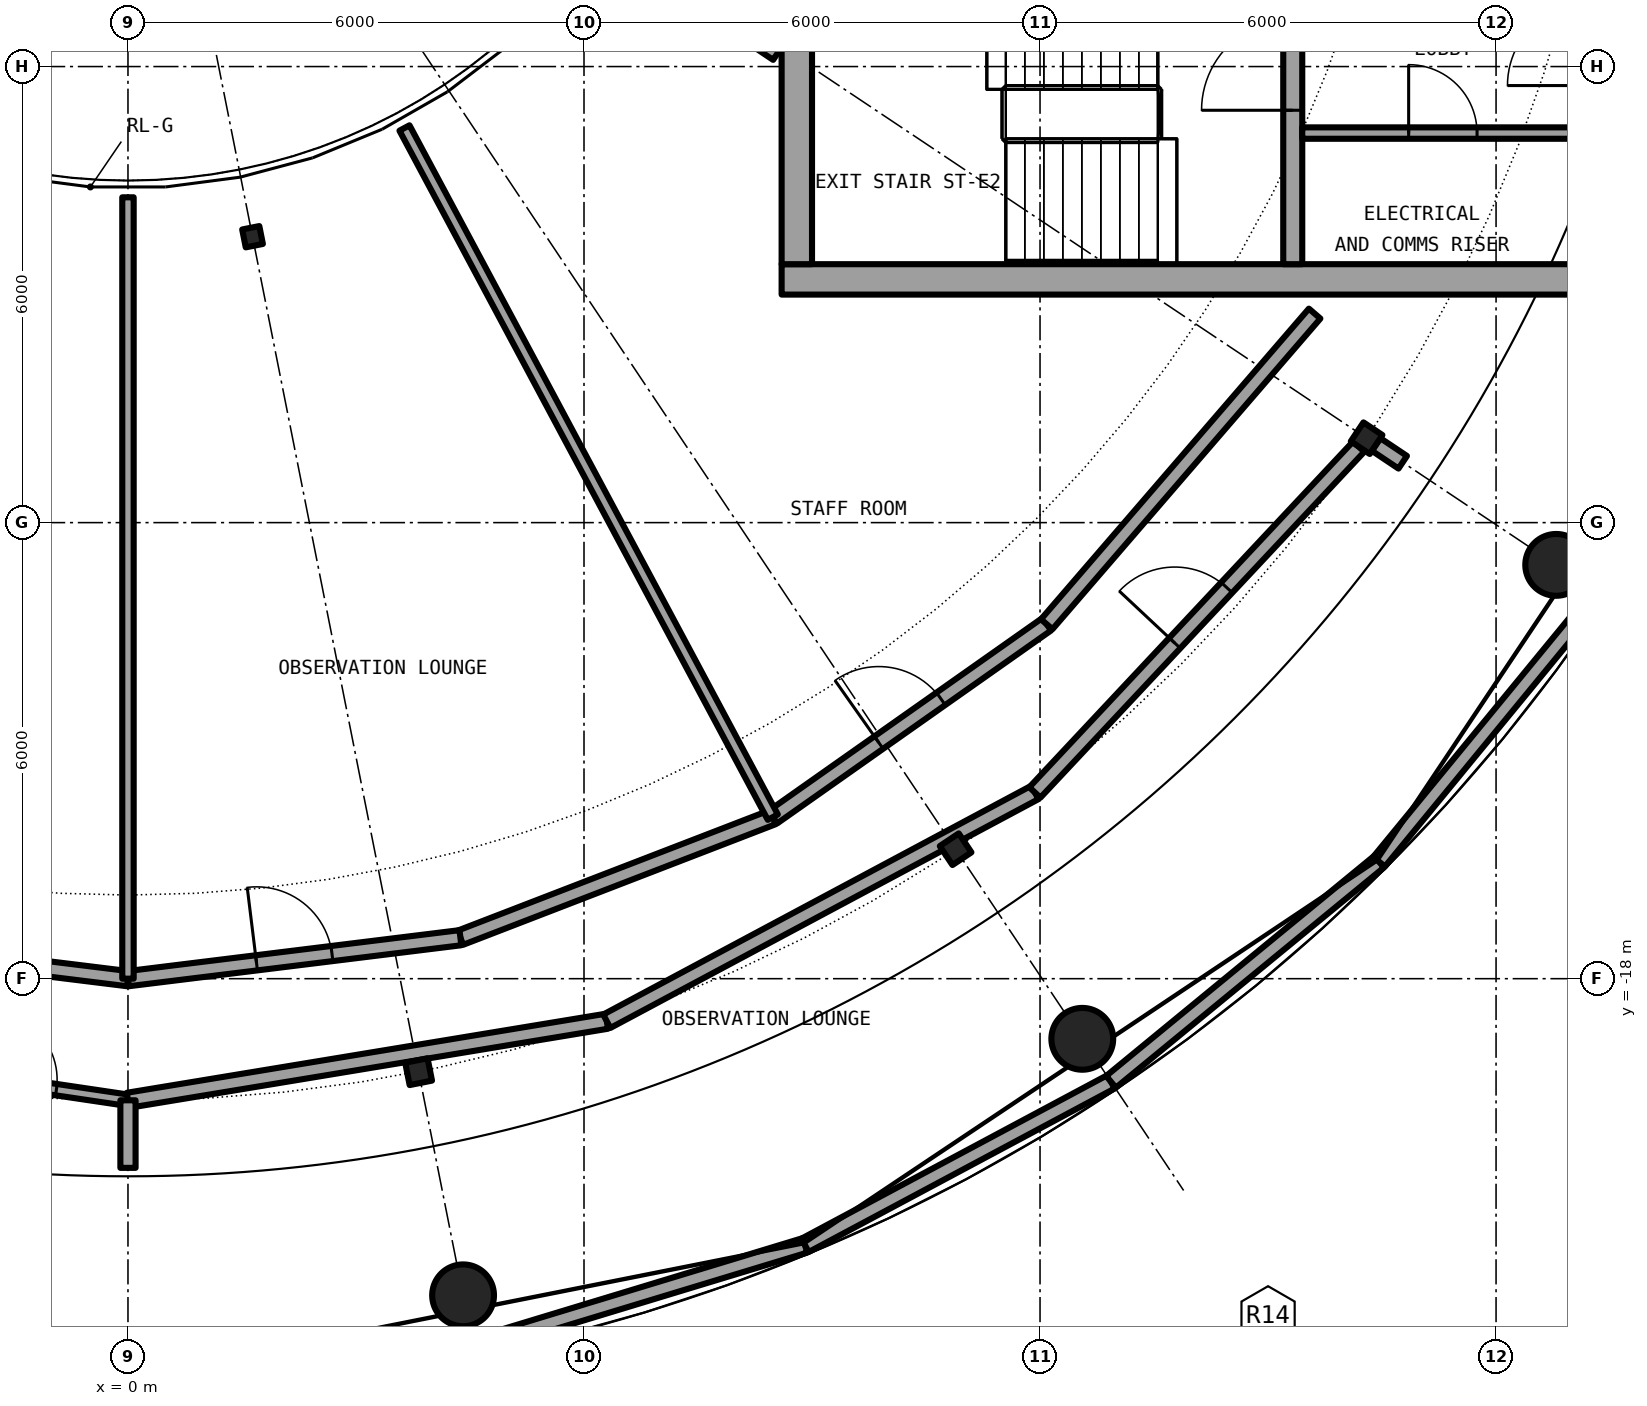
"""IFC4 building model, lengths in metres.
Left out: names, types, materials, properties, quantities, classifications, styles, units other than length and angle.
Written with IfcOpenShell. Run it as: python <this file> out.ifc"""

import sys

from ifc_helpers import new_model, si_unit, direction, frame, frame_2d, origin, origin_2d, place, context, subcontext, project, spatial, rectangle, hollow_circle, i_section, extrude, element, fill, save


model = new_model("IFC4")
c1 = context("Model", 3, precision=1e-05, world=origin(), true_north=direction((0.0, 1.0)))
c2 = subcontext(c1, "Body", "Model", "MODEL_VIEW")
j1 = project(units=[si_unit("LENGTHUNIT", "METRE"), si_unit("PLANEANGLEUNIT", "RADIAN")], contexts=[c1])
p1 = place(None, origin())
s1 = spatial("IfcSite", under=j1, at=p1, CompositionType="ELEMENT")
p2 = place(p1, origin())
s2 = spatial("IfcBuilding", under=s1, at=p2, CompositionType="ELEMENT")
p3 = place(p2, frame((0.0, 0.0, 255.4)))
s3 = spatial("IfcBuildingStorey", under=s2, at=p3, CompositionType="ELEMENT", Elevation=255.4)
for number, where, z_axis, x_axis in (
    (1, (4.409, -22.166, 0.0), (0.0, 0.0, 1.0), (1.0, 0.0, 0.0)),
    (2, (12.556, -18.791, 0.0), (0.0, 0.0, 1.0), (1.0, 0.0, 0.0)),
    (3, (18.791, -12.556, 0.0), (0.0, 0.0, 1.0), (1.0, 0.0, 0.0)),
):
    element("IfcColumn", number, at=place(p3, frame(where, z_axis=z_axis, x_axis=x_axis)), inside=s3, PredefinedType="COLUMN", context=c2, shape_type="SweptSolid", body=[
        extrude(hollow_circle(Radius=0.406, WallThickness=0.03, at=origin_2d()), origin(), (0.0, 0.0, 1.0), 6.1),
    ])
for number, where, z_axis, x_axis in (
    (4, (3.824, -19.223, 0.0), (0.0, 0.0, 1.0), (0.195, -0.981, 0.0)),
    (5, (10.889, -16.297, 0.0), (0.0, 0.0, 1.0), (0.556, -0.831, 0.0)),
    (6, (16.297, -10.889, 0.0), (0.0, 0.0, 1.0), (0.831, -0.556, 0.0)),
):
    element("IfcColumn", number, at=place(p3, frame(where, z_axis=z_axis, x_axis=x_axis)), inside=s3, PredefinedType="COLUMN", context=c2, shape_type="SweptSolid", body=[
        extrude(i_section(OverallWidth=0.3, OverallDepth=0.3, WebThickness=0.011, FlangeThickness=0.019, FilletRadius=0.027, at=origin_2d()), origin(), (0.0, 0.0, 1.0), 6.1),
    ])
p4 = place(p3, frame((1.639, -8.239, 0.0), z_axis=(0.0, 0.0, 1.0), x_axis=(0.195090322016, -0.980785280403, 0.0)))
e7 = element("IfcColumn", 7, at=p4, inside=s3, PredefinedType="COLUMN", context=c2, shape_type="SweptSolid", body=[
    extrude(i_section(OverallWidth=0.24, OverallDepth=0.23, WebThickness=0.008, FlangeThickness=0.012, FilletRadius=0.021, at=origin_2d()), origin(), (0.0, 0.0, 1.0), 6.1),
])
p5 = place(p3, frame((4.542, -22.833, 6.1), z_axis=(0.0, 0.0, 1.0), x_axis=(0.956924910545, 0.29033552242, 0.0)))
e8 = element("IfcWall", 8, at=p5, inside=s3, PredefinedType="PARAPET", context=c2, shape_type="SweptSolid", body=[
    extrude(rectangle(XDim=4.563, YDim=0.2, at=frame_2d((2.282, 0.0))), origin(), (0.0, 0.0, 1.0), 1.1),
])
p6 = place(p3, frame((8.909, -21.508, 6.1), z_axis=(0.0, 0.0, 1.0), x_axis=(0.881954289711, 0.471334945511, 0.0)))
e9 = element("IfcWall", 9, at=p6, inside=s3, PredefinedType="PARAPET", context=c2, shape_type="SweptSolid", body=[
    extrude(rectangle(XDim=4.564, YDim=0.2, at=frame_2d((2.282, 0.0))), origin(), (0.0, 0.0, 1.0), 1.1),
])
for number, where, z_axis, x_axis in (
    (10, (12.934, -19.357, 6.1), (0.0, 0.0, 1.0), (0.773, 0.635, 0.0)),
    (11, (16.461, -16.461, 6.1), (0.0, 0.0, 1.0), (0.635, 0.773, 0.0)),
):
    element("IfcWall", number, at=place(p3, frame(where, z_axis=z_axis, x_axis=x_axis)), inside=s3, PredefinedType="PARAPET", context=c2, shape_type="SweptSolid", body=[
        extrude(rectangle(XDim=4.563, YDim=0.2, at=frame_2d((2.282, 0.0))), origin(), (0.0, 0.0, 1.0), 1.1),
    ])
p7 = place(p3, frame((8.6, -8.8, 0.0), z_axis=(0.0, 0.0, 1.0), x_axis=(1.0, 0.0, 0.0)))
e12 = element("IfcWall", 12, at=p7, inside=s3, PredefinedType="SHEAR", context=c2, shape_type="SweptSolid", body=[
    extrude(rectangle(XDim=12.5, YDim=0.4, at=frame_2d((6.25, 0.0))), origin(), (0.0, 0.0, 1.0), 6.1),
])
p8 = place(p7, frame((10.825, 0.0, 0.0)))
e13 = element("IfcOpeningElement", 13, at=p8, cuts=e12, PredefinedType="OPENING", context=c2, shape_type="SweptSolid", body=[
    extrude(rectangle(XDim=1.2, YDim=2.3, at=frame_2d((0.6, 1.15))), frame((0.0, 0.21, 0.0), z_axis=(0.0, -1.0, 0.0), x_axis=(1.0, 0.0, 0.0)), (0.0, 0.0, 1.0), 0.42),
])
p9 = place(p3, frame((8.8, -8.6, 0.0), z_axis=(0.0, 0.0, 1.0), x_axis=(0.0, 1.0, 0.0)))
e14 = element("IfcWall", 14, at=p9, inside=s3, PredefinedType="SHEAR", context=c2, shape_type="SweptSolid", body=[
    extrude(rectangle(XDim=17.2, YDim=0.4, at=frame_2d((8.6, 0.0))), origin(), (0.0, 0.0, 1.0), 6.1),
])
p10 = place(p9, frame((7.4, 0.0, 0.1)))
e15 = element("IfcOpeningElement", 15, at=p10, cuts=e14, PredefinedType="OPENING", context=c2, shape_type="SweptSolid", body=[
    extrude(rectangle(XDim=2.4, YDim=2.2, at=frame_2d((1.2, 1.1))), frame((0.0, 0.21, 0.0), z_axis=(0.0, -1.0, 0.0), x_axis=(1.0, 0.0, 0.0)), (0.0, 0.0, 1.0), 0.42),
])
p11 = place(p3, frame((15.325, -8.6, 0.0), z_axis=(0.0, 0.0, 1.0), x_axis=(0.0, 1.0, 0.0)))
e16 = element("IfcWall", 16, at=p11, inside=s3, PredefinedType="SHEAR", context=c2, shape_type="SweptSolid", body=[
    extrude(rectangle(XDim=3.95, YDim=0.25, at=frame_2d((1.975, 0.0))), origin(), (0.0, 0.0, 1.0), 6.1),
])
p12 = place(p11, frame((2.025, 0.0, 0.0)))
e17 = element("IfcOpeningElement", 17, at=p12, cuts=e16, PredefinedType="OPENING", context=c2, shape_type="SweptSolid", body=[
    extrude(rectangle(XDim=1.2, YDim=2.3, at=frame_2d((0.6, 1.15))), frame((0.0, 0.135, 0.0), z_axis=(0.0, -1.0, 0.0), x_axis=(1.0, 0.0, 0.0)), (0.0, 0.0, 1.0), 0.27),
])
p13 = place(p3, frame((15.45, -6.875, 0.0), z_axis=(0.0, 0.0, 1.0), x_axis=(1.0, 0.0, 0.0)))
e18 = element("IfcWall", 18, at=p13, inside=s3, PredefinedType="PARTITIONING", context=c2, shape_type="SweptSolid", body=[
    extrude(rectangle(XDim=3.7, YDim=0.15, at=frame_2d((1.85, 0.0))), origin(), (0.0, 0.0, 1.0), 5.75),
])
p14 = place(p13, frame((1.4, 0.0, 0.0)))
e19 = element("IfcOpeningElement", 19, at=p14, cuts=e18, PredefinedType="OPENING", context=c2, shape_type="SweptSolid", body=[
    extrude(rectangle(XDim=0.9, YDim=2.3, at=frame_2d((0.45, 1.15))), frame((0.0, 0.085, 0.0), z_axis=(0.0, -1.0, 0.0), x_axis=(1.0, 0.0, 0.0)), (0.0, 0.0, 1.0), 0.17),
])
p15 = place(p3, frame((-5.69, -18.756, 0.0), z_axis=(0.0, 0.0, 1.0), x_axis=(0.989177240103, -0.146725552177, 0.0)))
e20 = element("IfcWall", 20, at=p15, inside=s3, PredefinedType="PARTITIONING", context=c2, shape_type="SweptSolid", body=[
    extrude(rectangle(XDim=5.752, YDim=0.15, at=frame_2d((2.876, 0.0))), origin(), (0.0, 0.0, 1.0), 5.5),
])
p16 = place(p15, frame((2.55, 0.0, 0.0)))
e21 = element("IfcOpeningElement", 21, at=p16, cuts=e20, PredefinedType="OPENING", context=c2, shape_type="SweptSolid", body=[
    extrude(rectangle(XDim=1.0, YDim=2.3, at=frame_2d((0.5, 1.15))), frame((0.0, 0.085, 0.0), z_axis=(0.0, -1.0, 0.0), x_axis=(1.0, 0.0, 0.0)), (0.0, 0.0, 1.0), 0.17),
])
p17 = place(p15, frame((3.9, 0.0, 0.0)))
e22 = element("IfcOpeningElement", 22, at=p17, cuts=e20, PredefinedType="OPENING", context=c2, shape_type="SweptSolid", body=[
    extrude(rectangle(XDim=0.9, YDim=2.3, at=frame_2d((0.45, 1.15))), frame((0.0, 0.085, 0.0), z_axis=(0.0, -1.0, 0.0), x_axis=(1.0, 0.0, 0.0)), (0.0, 0.0, 1.0), 0.17),
])
p18 = place(p3, frame((0.0, -19.6, 0.0), z_axis=(0.0, 0.0, 1.0), x_axis=(0.986645929742, 0.162879738837, 0.0)))
e23 = element("IfcWall", 23, at=p18, inside=s3, PredefinedType="PARTITIONING", context=c2, shape_type="SweptSolid", body=[
    extrude(rectangle(XDim=6.385, YDim=0.2, at=frame_2d((3.193, 0.0))), origin(), (0.0, 0.0, 1.0), 5.5),
])
p19 = place(p3, frame((6.3, -18.56, 0.0), z_axis=(0.0, 0.0, 1.0), x_axis=(0.88193879345, 0.471363940716, 0.0)))
e24 = element("IfcWall", 24, at=p19, inside=s3, PredefinedType="PARTITIONING", context=c2, shape_type="SweptSolid", body=[
    extrude(rectangle(XDim=6.386, YDim=0.2, at=frame_2d((3.193, 0.0))), origin(), (0.0, 0.0, 1.0), 5.5),
])
p20 = place(p3, frame((11.932, -15.55, 0.0), z_axis=(0.0, 0.0, 1.0), x_axis=(0.683561939148, 0.729892509448, 0.0)))
e25 = element("IfcWall", 25, at=p20, inside=s3, PredefinedType="PARTITIONING", context=c2, shape_type="SweptSolid", body=[
    extrude(rectangle(XDim=6.234, YDim=0.2, at=frame_2d((3.117, 0.0))), origin(), (0.0, 0.0, 1.0), 5.5),
])
p21 = place(p20, frame((2.693, 0.0, 0.0)))
e26 = element("IfcOpeningElement", 26, at=p21, cuts=e25, PredefinedType="OPENING", context=c2, shape_type="SweptSolid", body=[
    extrude(rectangle(XDim=1.0, YDim=2.3, at=frame_2d((0.5, 1.15))), frame((0.0, 0.11, 0.0), z_axis=(0.0, -1.0, 0.0), x_axis=(1.0, 0.0, 0.0)), (0.0, 0.0, 1.0), 0.22),
])
p22 = place(p3, frame((4.374, -17.461, 0.0), z_axis=(0.0, 0.0, 1.0), x_axis=(0.932983851272, 0.35991823136, 0.0)))
e27 = element("IfcWall", 27, at=p22, inside=s3, PredefinedType="PARTITIONING", context=c2, shape_type="SweptSolid", body=[
    extrude(rectangle(XDim=4.406, YDim=0.2, at=frame_2d((2.203, 0.0))), origin(), (0.0, 0.0, 1.0), 5.75),
])
p23 = place(p3, frame((-4.374, -17.461, 0.0), z_axis=(0.0, 0.0, 1.0), x_axis=(0.992491158779, -0.122316391973, 0.0)))
e28 = element("IfcWall", 28, at=p23, inside=s3, PredefinedType="PARTITIONING", context=c2, shape_type="SweptSolid", body=[
    extrude(rectangle(XDim=4.407, YDim=0.2, at=frame_2d((2.204, 0.0))), origin(), (0.0, 0.0, 1.0), 5.75),
])
p24 = place(p23, frame((1.704, 0.0, 0.0)))
e29 = element("IfcOpeningElement", 29, at=p24, cuts=e28, PredefinedType="OPENING", context=c2, shape_type="SweptSolid", body=[
    extrude(rectangle(XDim=1.0, YDim=2.3, at=frame_2d((0.5, 1.15))), frame((0.0, 0.11, 0.0), z_axis=(0.0, -1.0, 0.0), x_axis=(1.0, 0.0, 0.0)), (0.0, 0.0, 1.0), 0.22),
])
p25 = place(p3, frame((0.0, -18.0, 0.0), z_axis=(0.0, 0.0, 1.0), x_axis=(0.992491158779, 0.122316391973, 0.0)))
e30 = element("IfcWall", 30, at=p25, inside=s3, PredefinedType="PARTITIONING", context=c2, shape_type="SweptSolid", body=[
    extrude(rectangle(XDim=4.407, YDim=0.2, at=frame_2d((2.204, 0.0))), origin(), (0.0, 0.0, 1.0), 5.75),
])
p26 = place(p25, frame((1.704, 0.0, 0.0)))
e31 = element("IfcOpeningElement", 31, at=p26, cuts=e30, PredefinedType="OPENING", context=c2, shape_type="SweptSolid", body=[
    extrude(rectangle(XDim=1.0, YDim=2.3, at=frame_2d((0.5, 1.15))), frame((0.0, 0.11, 0.0), z_axis=(0.0, -1.0, 0.0), x_axis=(1.0, 0.0, 0.0)), (0.0, 0.0, 1.0), 0.22),
])
p27 = place(p3, frame((8.485, -15.875, 0.0), z_axis=(0.0, 0.0, 1.0), x_axis=(0.817507922666, 0.575917352038, 0.0)))
e32 = element("IfcWall", 32, at=p27, inside=s3, PredefinedType="PARTITIONING", context=c2, shape_type="SweptSolid", body=[
    extrude(rectangle(XDim=4.407, YDim=0.2, at=frame_2d((2.204, 0.0))), origin(), (0.0, 0.0, 1.0), 5.75),
])
p28 = place(p27, frame((1.704, 0.0, 0.0)))
e33 = element("IfcOpeningElement", 33, at=p28, cuts=e32, PredefinedType="OPENING", context=c2, shape_type="SweptSolid", body=[
    extrude(rectangle(XDim=1.0, YDim=2.3, at=frame_2d((0.5, 1.15))), frame((0.0, 0.11, 0.0), z_axis=(0.0, -1.0, 0.0), x_axis=(1.0, 0.0, 0.0)), (0.0, 0.0, 1.0), 0.22),
])
p29 = place(p3, frame((12.088, -13.337, 0.0), z_axis=(0.0, 0.0, 1.0), x_axis=(0.653146301984, 0.757231740093, 0.0)))
e34 = element("IfcWall", 34, at=p29, inside=s3, PredefinedType="PARTITIONING", context=c2, shape_type="SweptSolid", body=[
    extrude(rectangle(XDim=5.397, YDim=0.2, at=frame_2d((2.699, 0.0))), origin(), (0.0, 0.0, 1.0), 5.75),
])
p30 = place(p3, frame((6.513, -4.472, 0.0), z_axis=(0.0, 0.0, 1.0), x_axis=(0.831450132577, -0.555599385382, 0.0)))
e35 = element("IfcWall", 35, at=p30, inside=s3, PredefinedType="PARTITIONING", context=c2, shape_type="SweptSolid", body=[
    extrude(rectangle(XDim=2.443, YDim=0.2, at=frame_2d((1.221, 0.0))), origin(), (0.0, 0.0, 1.0), 5.75),
])
p31 = place(p3, frame((0.0, -20.489, 0.0), z_axis=(0.0, 0.0, 1.0), x_axis=(0.0, 1.0, 0.0)))
e36 = element("IfcWall", 36, at=p31, inside=s3, PredefinedType="PARTITIONING", context=c2, shape_type="SweptSolid", body=[
    extrude(rectangle(XDim=0.889, YDim=0.2, at=frame_2d((0.444, 0.0))), origin(), (0.0, 0.0, 1.0), 5.75),
])
p32 = place(p3, frame((0.0, -18.0, 0.0), z_axis=(0.0, 0.0, 1.0), x_axis=(0.0, 1.0, 0.0)))
e37 = element("IfcWall", 37, at=p32, inside=s3, PredefinedType="PARTITIONING", context=c2, shape_type="SweptSolid", body=[
    extrude(rectangle(XDim=10.28, YDim=0.15, at=frame_2d((5.14, 0.0))), origin(), (0.0, 0.0, 1.0), 5.75),
])
p33 = place(p3, frame((3.638, -6.808, 0.0), z_axis=(0.0, 0.0, 1.0), x_axis=(0.471365806418, -0.881937796299, 0.0)))
e38 = element("IfcWall", 38, at=p33, inside=s3, PredefinedType="PARTITIONING", context=c2, shape_type="SweptSolid", body=[
    extrude(rectangle(XDim=10.281, YDim=0.15, at=frame_2d((5.14, 0.0))), origin(), (0.0, 0.0, 1.0), 5.75),
])
p34 = place(p3, frame((16.422, -10.972, 0.0), z_axis=(0.0, 0.0, 1.0), x_axis=(0.831067539056, -0.556171507296, 0.0)))
e39 = element("IfcWall", 39, at=p34, inside=s3, PredefinedType="PARTITIONING", context=c2, shape_type="SweptSolid", body=[
    extrude(rectangle(XDim=0.421, YDim=0.2, at=frame_2d((0.21, 0.0))), origin(), (0.0, 0.0, 1.0), 5.75),
])
p35 = place(p3, frame((0.0, 0.0, 5.75)))
p36 = place(p35, frame((11.075, -19.182, 0.0)))
p37 = place(p36, frame((0.0, 0.0, 0.3)))
e40 = element("IfcWindow", 40, at=p37, inside=s3, PartitioningType="SINGLE_PANEL", PredefinedType="SKYLIGHT", context=c2, shape_type="SweptSolid", body=[
    extrude(rectangle(XDim=1.0, YDim=1.0, at=origin_2d()), origin(), (0.0, 0.0, 1.0), 0.05),
])
p38 = place(p14, origin())
e41 = element("IfcDoor", 41, at=p38, inside=s3, OperationType="SINGLE_SWING_LEFT", PredefinedType="DOOR", context=c2, shape_type="SweptSolid", body=[
    extrude(rectangle(XDim=0.9, YDim=2.3, at=frame_2d((0.45, 1.15))), frame((0.0, 0.025, 0.0), z_axis=(0.0, -1.0, 0.0), x_axis=(1.0, 0.0, 0.0)), (0.0, 0.0, 1.0), 0.05),
])
fill(e19, e41)
p39 = place(p12, origin())
e42 = element("IfcDoor", 42, at=p39, inside=s3, OperationType="SINGLE_SWING_LEFT", PredefinedType="DOOR", context=c2, shape_type="SweptSolid", body=[
    extrude(rectangle(XDim=1.2, YDim=2.3, at=frame_2d((0.6, 1.15))), frame((0.0, 0.025, 0.0), z_axis=(0.0, -1.0, 0.0), x_axis=(1.0, 0.0, 0.0)), (0.0, 0.0, 1.0), 0.05),
])
fill(e17, e42)
p40 = place(p21, origin())
e43 = element("IfcDoor", 43, at=p40, inside=s3, OperationType="SINGLE_SWING_RIGHT", PredefinedType="DOOR", context=c2, shape_type="SweptSolid", body=[
    extrude(rectangle(XDim=1.0, YDim=2.3, at=frame_2d((0.5, 1.15))), frame((0.0, 0.025, 0.0), z_axis=(0.0, -1.0, 0.0), x_axis=(1.0, 0.0, 0.0)), (0.0, 0.0, 1.0), 0.05),
])
fill(e26, e43)
p41 = place(p26, origin())
e44 = element("IfcDoor", 44, at=p41, inside=s3, OperationType="SINGLE_SWING_RIGHT", PredefinedType="DOOR", context=c2, shape_type="SweptSolid", body=[
    extrude(rectangle(XDim=1.0, YDim=2.3, at=frame_2d((0.5, 1.15))), frame((0.0, 0.025, 0.0), z_axis=(0.0, -1.0, 0.0), x_axis=(1.0, 0.0, 0.0)), (0.0, 0.0, 1.0), 0.05),
])
fill(e31, e44)
p42 = place(p28, origin())
e45 = element("IfcDoor", 45, at=p42, inside=s3, OperationType="SINGLE_SWING_RIGHT", PredefinedType="DOOR", context=c2, shape_type="SweptSolid", body=[
    extrude(rectangle(XDim=1.0, YDim=2.3, at=frame_2d((0.5, 1.15))), frame((0.0, 0.025, 0.0), z_axis=(0.0, -1.0, 0.0), x_axis=(1.0, 0.0, 0.0)), (0.0, 0.0, 1.0), 0.05),
])
fill(e33, e45)
p43 = place(p17, origin())
e46 = element("IfcDoor", 46, at=p43, inside=s3, OperationType="SINGLE_SWING_RIGHT", PredefinedType="DOOR", context=c2, shape_type="SweptSolid", body=[
    extrude(rectangle(XDim=0.9, YDim=2.3, at=frame_2d((0.45, 1.15))), frame((0.0, 0.025, 0.0), z_axis=(0.0, -1.0, 0.0), x_axis=(1.0, 0.0, 0.0)), (0.0, 0.0, 1.0), 0.05),
])
fill(e22, e46)
save(model, sys.argv[1])
